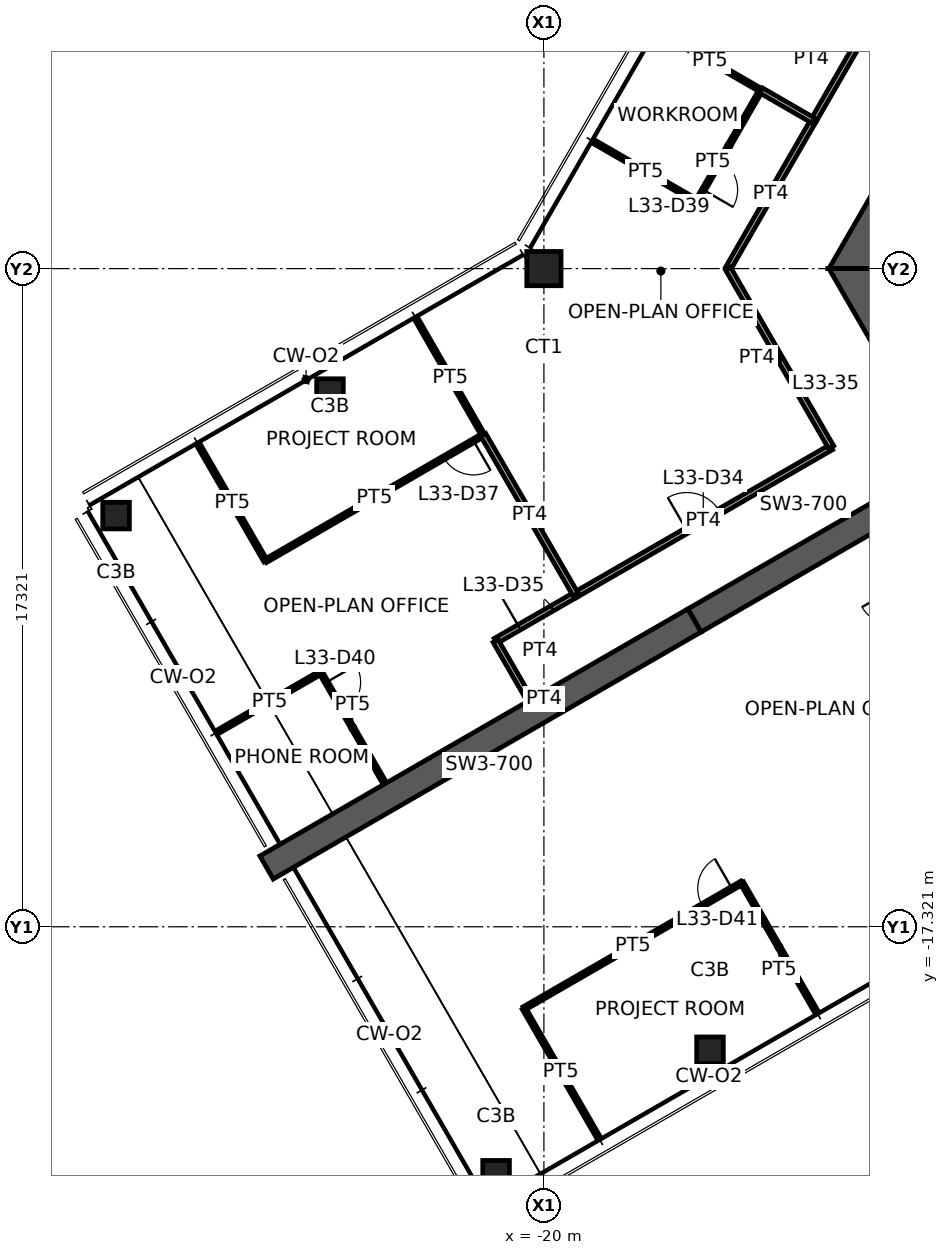
"""IFC4 building model, lengths in metres.
Left out: names, types, materials, properties, quantities, classifications, styles, units other than length and angle.
Written with IfcOpenShell. Run it as: python <this file> out.ifc"""

import sys

from ifc_helpers import new_model, si_unit, direction, frame, frame_2d, origin, origin_2d, place, context, subcontext, project, spatial, polyline, rectangle, hollow_rectangle, outline, extrude, element, fill, save


model = new_model("IFC4")
c1 = context("Model", 3, precision=1e-05, world=origin(), true_north=direction((0.0, 1.0)))
c2 = subcontext(c1, "Body", "Model", "MODEL_VIEW")
j1 = project(units=[si_unit("LENGTHUNIT", "METRE"), si_unit("PLANEANGLEUNIT", "RADIAN")], contexts=[c1])
p1 = place(None, origin())
s1 = spatial("IfcSite", under=j1, at=p1, CompositionType="ELEMENT")
p2 = place(p1, origin())
s2 = spatial("IfcBuilding", under=s1, at=p2, CompositionType="ELEMENT")
p3 = place(p2, frame((0.0, 0.0, 133.1)))
s3 = spatial("IfcBuildingStorey", under=s2, at=p3, CompositionType="ELEMENT", Elevation=133.1)
p4 = place(p3, frame((-20.0, 0.0, 0.0), z_axis=(0.0, 0.0, 1.0), x_axis=(1.0, 0.0, 0.0)))
e1 = element("IfcColumn", 1, at=p4, inside=s3, PredefinedType="COLUMN", context=c2, shape_type="SweptSolid", body=[
    extrude(hollow_rectangle(XDim=0.9, YDim=0.9, WallThickness=0.07, at=origin_2d()), origin(), (0.0, 0.0, 1.0), 3.9),
])
for number, where, z_axis, x_axis in (
    (2, (-25.629, -3.25, 0.0), (0.0, 0.0, 1.0), (1.0, 0.0, 0.0)),
    (3, (-31.258, -6.5, 0.0), (0.0, 0.0, 1.0), (1.0, 0.0, 0.0)),
    (4, (-15.629, -20.571, 0.0), (0.0, 0.0, 1.0), (1.0, 0.0, 0.0)),
    (5, (-21.258, -23.821, 0.0), (0.0, 0.0, 1.0), (1.0, 0.0, 0.0)),
):
    element("IfcColumn", number, at=place(p3, frame(where, z_axis=z_axis, x_axis=x_axis)), inside=s3, PredefinedType="COLUMN", context=c2, shape_type="SweptSolid", body=[
        extrude(hollow_rectangle(XDim=0.7, YDim=0.7, WallThickness=0.036, at=origin_2d()), origin(), (0.0, 0.0, 1.0), 3.9),
    ])
p5 = place(p3, frame((-5.961, 10.325, 0.0), z_axis=(0.0, 0.0, 1.0), x_axis=(-0.500004296715, -0.866022923061, 0.0)))
e6 = element("IfcWall", 6, at=p5, inside=s3, PredefinedType="SHEAR", context=c2, shape_type="SweptSolid", body=[
    extrude(outline(polyline([(-0.289, -0.5), (4.494, -0.5), (5.494, -0.5), (12.211, -0.5), (11.634, 0.5), (5.494, 0.5), (4.494, 0.5), (0.289, 0.5), (-0.289, -0.5)])), origin(), (0.0, 0.0, 1.0), 3.9),
])
p6 = place(p5, frame((4.494, 0.0, 0.0)))
e7 = element("IfcOpeningElement", 7, at=p6, cuts=e6, PredefinedType="OPENING", context=c2, shape_type="SweptSolid", body=[
    extrude(rectangle(XDim=1.0, YDim=2.1, at=frame_2d((0.5, 1.05))), frame((0.0, 0.51, 0.0), z_axis=(0.0, -1.0, 0.0), x_axis=(1.0, 0.0, 0.0)), (0.0, 0.0, 1.0), 1.02),
])
p7 = place(p3, frame((-11.922, 0.0, 0.0), z_axis=(0.0, 0.0, 1.0), x_axis=(0.500004296715, -0.866022923061, 0.0)))
e8 = element("IfcWall", 8, at=p7, inside=s3, PredefinedType="SHEAR", context=c2, shape_type="SweptSolid", body=[
    extrude(outline(polyline([(-0.289, -0.5), (6.331, -0.5), (7.131, -0.5), (12.211, -0.5), (11.634, 0.5), (7.131, 0.5), (6.331, 0.5), (0.289, 0.5), (-0.289, -0.5)])), origin(), (0.0, 0.0, 1.0), 3.9),
])
p8 = place(p7, frame((6.331, 0.0, 0.0)))
e9 = element("IfcOpeningElement", 9, at=p8, cuts=e8, PredefinedType="OPENING", context=c2, shape_type="SweptSolid", body=[
    extrude(rectangle(XDim=0.8, YDim=2.1, at=frame_2d((0.4, 1.05))), frame((0.0, 0.51, 0.0), z_axis=(0.0, -1.0, 0.0), x_axis=(1.0, 0.0, 0.0)), (0.0, 0.0, 1.0), 1.02),
])
p9 = place(p3, frame((-9.375, -5.413, 0.0), z_axis=(0.0, 0.0, 1.0), x_axis=(-0.866032377459, -0.499987921047, 0.0)))
e10 = element("IfcWall", 10, at=p9, inside=s3, PredefinedType="SHEAR", context=c2, shape_type="SweptSolid", body=[
    extrude(rectangle(XDim=7.696, YDim=0.7, at=frame_2d((3.848, 0.0))), origin(), (0.0, 0.0, 1.0), 3.9),
])
p10 = place(p9, frame((0.9, 0.0, 0.0)))
e11 = element("IfcOpeningElement", 11, at=p10, cuts=e10, PredefinedType="OPENING", context=c2, shape_type="SweptSolid", body=[
    extrude(rectangle(XDim=1.0, YDim=2.1, at=frame_2d((0.5, 1.05))), frame((0.0, 0.36, 0.0), z_axis=(0.0, -1.0, 0.0), x_axis=(1.0, 0.0, 0.0)), (0.0, 0.0, 1.0), 0.72),
])
p11 = place(p3, frame((-16.039, -9.26, 0.0), z_axis=(0.0, 0.0, 1.0), x_axis=(-0.866024837091, -0.50000098154, 0.0)))
e12 = element("IfcWall", 12, at=p11, inside=s3, PredefinedType="SHEAR", context=c2, shape_type="SweptSolid", body=[
    extrude(rectangle(XDim=13.0, YDim=0.7, at=frame_2d((6.5, 0.0))), origin(), (0.0, 0.0, 1.0), 3.9),
])
p12 = place(p3, frame((-19.171, -8.586, 0.0), z_axis=(0.0, 0.0, 1.0), x_axis=(0.866007176269, 0.500031569654, 0.0)))
e13 = element("IfcWall", 13, at=p12, inside=s3, PredefinedType="PARTITIONING", context=c2, shape_type="SweptSolid", body=[
    extrude(rectangle(XDim=7.771, YDim=0.15, at=frame_2d((3.885, 0.0))), origin(), (0.0, 0.0, 1.0), 2.95),
])
p13 = place(p12, frame((3.385, 0.0, 0.0)))
e14 = element("IfcOpeningElement", 14, at=p13, cuts=e13, PredefinedType="OPENING", context=c2, shape_type="SweptSolid", body=[
    extrude(rectangle(XDim=1.0, YDim=2.1, at=frame_2d((0.5, 1.05))), frame((0.0, 0.085, 0.0), z_axis=(0.0, -1.0, 0.0), x_axis=(1.0, 0.0, 0.0)), (0.0, 0.0, 1.0), 0.17),
])
p14 = place(p3, frame((-15.156, 0.0, 0.0), z_axis=(0.0, 0.0, 1.0), x_axis=(0.500014848696, 0.866016830716, 0.0)))
e15 = element("IfcWall", 15, at=p14, inside=s3, PredefinedType="PARTITIONING", context=c2, shape_type="SweptSolid", body=[
    extrude(rectangle(XDim=4.505, YDim=0.15, at=frame_2d((2.252, 0.0))), origin(), (0.0, 0.0, 1.0), 2.95),
])
p15 = place(p3, frame((-12.442, -4.7, 0.0), z_axis=(0.0, 0.0, 1.0), x_axis=(-0.500009286329, 0.866020042254, 0.0)))
e16 = element("IfcWall", 16, at=p15, inside=s3, PredefinedType="PARTITIONING", context=c2, shape_type="SweptSolid", body=[
    extrude(rectangle(XDim=5.428, YDim=0.15, at=frame_2d((2.714, 0.0))), origin(), (0.0, 0.0, 1.0), 2.95),
])
p16 = place(p3, frame((-21.271, -9.798, 0.0), z_axis=(0.0, 0.0, 1.0), x_axis=(0.866025270247, 0.500000231294, 0.0)))
e17 = element("IfcWall", 17, at=p16, inside=s3, PredefinedType="PARTITIONING", context=c2, shape_type="SweptSolid", body=[
    extrude(rectangle(XDim=2.435, YDim=0.15, at=frame_2d((1.217, 0.0))), origin(), (0.0, 0.0, 1.0), 2.95),
])
p17 = place(p16, frame((0.717, 0.0, 0.0)))
e18 = element("IfcOpeningElement", 18, at=p17, cuts=e17, PredefinedType="OPENING", context=c2, shape_type="SweptSolid", body=[
    extrude(rectangle(XDim=1.0, YDim=2.1, at=frame_2d((0.5, 1.05))), frame((0.0, 0.085, 0.0), z_axis=(0.0, -1.0, 0.0), x_axis=(1.0, 0.0, 0.0)), (0.0, 0.0, 1.0), 0.17),
])
p18 = place(p3, frame((-20.381, -11.34, 0.0), z_axis=(0.0, 0.0, 1.0), x_axis=(-0.500062787734, 0.865989150234, 0.0)))
e19 = element("IfcWall", 19, at=p18, inside=s3, PredefinedType="PARTITIONING", context=c2, shape_type="SweptSolid", body=[
    extrude(rectangle(XDim=1.78, YDim=0.15, at=frame_2d((0.89, 0.0))), origin(), (0.0, 0.0, 1.0), 2.95),
])
p19 = place(p3, frame((-12.908, 3.893, 0.0), z_axis=(0.0, 0.0, 1.0), x_axis=(0.500006411147, 0.866021702275, 0.0)))
e20 = element("IfcWall", 20, at=p19, inside=s3, PredefinedType="PARTITIONING", context=c2, shape_type="SweptSolid", body=[
    extrude(rectangle(XDim=7.095, YDim=0.15, at=frame_2d((3.548, 0.0))), origin(), (0.0, 0.0, 1.0), 2.95),
])
p20 = place(p19, frame((3.047, 0.0, 0.0)))
e21 = element("IfcOpeningElement", 21, at=p20, cuts=e20, PredefinedType="OPENING", context=c2, shape_type="SweptSolid", body=[
    extrude(rectangle(XDim=1.0, YDim=2.1, at=frame_2d((0.5, 1.05))), frame((0.0, 0.085, 0.0), z_axis=(0.0, -1.0, 0.0), x_axis=(1.0, 0.0, 0.0)), (0.0, 0.0, 1.0), 0.17),
])
p21 = place(p3, frame((-23.332, -1.37, 0.0), z_axis=(0.0, 0.0, 1.0), x_axis=(0.498863855434, -0.86668036423, 0.0)))
e22 = element("IfcWall", 22, at=p21, inside=s3, PredefinedType="PARTITIONING", context=c2, shape_type="SweptSolid", body=[
    extrude(rectangle(XDim=3.48, YDim=0.1, at=frame_2d((1.74, 0.0))), origin(), (0.0, 0.0, 1.0), 2.95),
])
p22 = place(p3, frame((-27.325, -7.693, 0.0), z_axis=(0.0, 0.0, 1.0), x_axis=(-0.499989765943, 0.866031312339, 0.0)))
e23 = element("IfcWall", 23, at=p22, inside=s3, PredefinedType="PARTITIONING", context=c2, shape_type="SweptSolid", body=[
    extrude(rectangle(XDim=3.505, YDim=0.1, at=frame_2d((1.752, 0.0))), origin(), (0.0, 0.0, 1.0), 2.95),
])
p23 = place(p3, frame((-21.594, -4.379, 0.0), z_axis=(0.0, 0.0, 1.0), x_axis=(-0.865682888643, -0.500592784916, 0.0)))
e24 = element("IfcWall", 24, at=p23, inside=s3, PredefinedType="PARTITIONING", context=c2, shape_type="SweptSolid", body=[
    extrude(rectangle(XDim=6.62, YDim=0.1, at=frame_2d((3.31, 0.0))), origin(), (0.0, 0.0, 1.0), 2.95),
])
p24 = place(p23, frame((0.3, 0.0, 0.0)))
e25 = element("IfcOpeningElement", 25, at=p24, cuts=e24, PredefinedType="OPENING", context=c2, shape_type="SweptSolid", body=[
    extrude(rectangle(XDim=0.9, YDim=2.1, at=frame_2d((0.45, 1.05))), frame((0.0, 0.06, 0.0), z_axis=(0.0, -1.0, 0.0), x_axis=(1.0, 0.0, 0.0)), (0.0, 0.0, 1.0), 0.12),
])
p25 = place(p3, frame((-15.974, 1.773, 0.0), z_axis=(0.0, 0.0, 1.0), x_axis=(-0.866032025414, 0.499988530825, 0.0)))
e26 = element("IfcWall", 26, at=p25, inside=s3, PredefinedType="PARTITIONING", context=c2, shape_type="SweptSolid", body=[
    extrude(rectangle(XDim=3.124, YDim=0.1, at=frame_2d((1.562, 0.0))), origin(), (0.0, 0.0, 1.0), 2.95),
])
p26 = place(p3, frame((-14.291, 4.698, 0.0), z_axis=(0.0, 0.0, 1.0), x_axis=(-0.498809626432, -0.86671157635, 0.0)))
e27 = element("IfcWall", 27, at=p26, inside=s3, PredefinedType="PARTITIONING", context=c2, shape_type="SweptSolid", body=[
    extrude(rectangle(XDim=3.374, YDim=0.1, at=frame_2d((1.687, 0.0))), origin(), (0.0, 0.0, 1.0), 2.95),
])
p27 = place(p26, frame((2.131, 0.0, 0.0)))
e28 = element("IfcOpeningElement", 28, at=p27, cuts=e27, PredefinedType="OPENING", context=c2, shape_type="SweptSolid", body=[
    extrude(rectangle(XDim=0.9, YDim=2.1, at=frame_2d((0.45, 1.05))), frame((0.0, 0.06, 0.0), z_axis=(0.0, -1.0, 0.0), x_axis=(1.0, 0.0, 0.0)), (0.0, 0.0, 1.0), 0.12),
])
for number, where, z_axis, x_axis in (
    (29, (-16.976, 6.248, 0.0), (0.0, 0.0, 1.0), (0.865, -0.501, 0.0)),
    (30, (-28.562, -12.18, 0.0), (0.0, 0.0, 1.0), (0.866, 0.5, 0.0)),
):
    element("IfcWall", number, at=place(p3, frame(where, z_axis=z_axis, x_axis=x_axis)), inside=s3, PredefinedType="PARTITIONING", context=c2, shape_type="SweptSolid", body=[
        extrude(rectangle(XDim=3.105, YDim=0.1, at=frame_2d((1.553, 0.0))), origin(), (0.0, 0.0, 1.0), 2.95),
    ])
p28 = place(p3, frame((-25.873, -10.627, 0.0), z_axis=(0.0, 0.0, 1.0), x_axis=(0.5000115033, -0.866018762249, 0.0)))
e31 = element("IfcWall", 31, at=p28, inside=s3, PredefinedType="PARTITIONING", context=c2, shape_type="SweptSolid", body=[
    extrude(rectangle(XDim=3.363, YDim=0.1, at=frame_2d((1.682, 0.0))), origin(), (0.0, 0.0, 1.0), 2.95),
])
p29 = place(p28, frame((0.3, 0.0, 0.0)))
e32 = element("IfcOpeningElement", 32, at=p29, cuts=e31, PredefinedType="OPENING", context=c2, shape_type="SweptSolid", body=[
    extrude(rectangle(XDim=0.9, YDim=2.1, at=frame_2d((0.45, 1.05))), frame((0.0, 0.06, 0.0), z_axis=(0.0, -1.0, 0.0), x_axis=(1.0, 0.0, 0.0)), (0.0, 0.0, 1.0), 0.12),
])
p30 = place(p3, frame((-19.163, -8.581, 0.0), z_axis=(0.0, 0.0, 1.0), x_axis=(-0.500843945189, 0.865537603209, 0.0)))
e33 = element("IfcWall", 33, at=p30, inside=s3, PredefinedType="PARTITIONING", context=c2, shape_type="SweptSolid", body=[
    extrude(rectangle(XDim=4.854, YDim=0.15, at=frame_2d((2.427, 0.0))), origin(), (0.0, 0.0, 1.0), 2.95),
])
p31 = place(p3, frame((-14.289, 4.691, 0.0), z_axis=(0.0, 0.0, 1.0), x_axis=(0.865925490132, -0.500173015605, 0.0)))
e34 = element("IfcWall", 34, at=p31, inside=s3, PredefinedType="PARTITIONING", context=c2, shape_type="SweptSolid", body=[
    extrude(rectangle(XDim=1.595, YDim=0.15, at=frame_2d((0.797, 0.0))), origin(), (0.0, 0.0, 1.0), 2.95),
])
p32 = place(p3, frame((-20.525, -19.471, 0.0), z_axis=(0.0, 0.0, 1.0), x_axis=(0.866021597574, 0.500006592492, 0.0)))
e35 = element("IfcWall", 35, at=p32, inside=s3, PredefinedType="PARTITIONING", context=c2, shape_type="SweptSolid", body=[
    extrude(rectangle(XDim=6.62, YDim=0.1, at=frame_2d((3.31, 0.0))), origin(), (0.0, 0.0, 1.0), 2.95),
])
p33 = place(p32, frame((5.42, 0.0, 0.0)))
e36 = element("IfcOpeningElement", 36, at=p33, cuts=e35, PredefinedType="OPENING", context=c2, shape_type="SweptSolid", body=[
    extrude(rectangle(XDim=0.9, YDim=2.1, at=frame_2d((0.45, 1.05))), frame((0.0, 0.06, 0.0), z_axis=(0.0, -1.0, 0.0), x_axis=(1.0, 0.0, 0.0)), (0.0, 0.0, 1.0), 0.12),
])
p34 = place(p3, frame((-18.585, -22.831, 0.0), z_axis=(0.0, 0.0, 1.0), x_axis=(-0.499996613652, 0.866027358884, 0.0)))
e37 = element("IfcWall", 37, at=p34, inside=s3, PredefinedType="PARTITIONING", context=c2, shape_type="SweptSolid", body=[
    extrude(rectangle(XDim=3.88, YDim=0.1, at=frame_2d((1.94, 0.0))), origin(), (0.0, 0.0, 1.0), 2.95),
])
p35 = place(p3, frame((-14.792, -16.161, 0.0), z_axis=(0.0, 0.0, 1.0), x_axis=(0.500025510799, -0.866010674617, 0.0)))
e38 = element("IfcWall", 38, at=p35, inside=s3, PredefinedType="PARTITIONING", context=c2, shape_type="SweptSolid", body=[
    extrude(rectangle(XDim=3.905, YDim=0.1, at=frame_2d((1.953, 0.0))), origin(), (0.0, 0.0, 1.0), 2.95),
])
p36 = place(p13, origin())
e39 = element("IfcDoor", 39, at=p36, inside=s3, OperationType="SINGLE_SWING_LEFT", PredefinedType="DOOR", context=c2, shape_type="SweptSolid", body=[
    extrude(rectangle(XDim=1.0, YDim=2.1, at=frame_2d((0.5, 1.05))), frame((0.0, 0.025, 0.0), z_axis=(0.0, -1.0, 0.0), x_axis=(1.0, 0.0, 0.0)), (0.0, 0.0, 1.0), 0.05),
])
fill(e14, e39)
p37 = place(p17, origin())
e40 = element("IfcDoor", 40, at=p37, inside=s3, OperationType="SINGLE_SWING_LEFT", PredefinedType="DOOR", context=c2, shape_type="SweptSolid", body=[
    extrude(rectangle(XDim=1.0, YDim=2.1, at=frame_2d((0.5, 1.05))), frame((0.0, 0.025, 0.0), z_axis=(0.0, -1.0, 0.0), x_axis=(1.0, 0.0, 0.0)), (0.0, 0.0, 1.0), 0.05),
])
fill(e18, e40)
p38 = place(p24, origin())
e41 = element("IfcDoor", 41, at=p38, inside=s3, OperationType="SINGLE_SWING_LEFT", PredefinedType="DOOR", context=c2, shape_type="SweptSolid", body=[
    extrude(rectangle(XDim=0.9, YDim=2.1, at=frame_2d((0.45, 1.05))), frame((0.0, 0.025, 0.0), z_axis=(0.0, -1.0, 0.0), x_axis=(1.0, 0.0, 0.0)), (0.0, 0.0, 1.0), 0.05),
])
fill(e25, e41)
p39 = place(p27, origin())
e42 = element("IfcDoor", 42, at=p39, inside=s3, OperationType="SINGLE_SWING_RIGHT", PredefinedType="DOOR", context=c2, shape_type="SweptSolid", body=[
    extrude(rectangle(XDim=0.9, YDim=2.1, at=frame_2d((0.45, 1.05))), frame((0.0, 0.025, 0.0), z_axis=(0.0, -1.0, 0.0), x_axis=(1.0, 0.0, 0.0)), (0.0, 0.0, 1.0), 0.05),
])
fill(e28, e42)
p40 = place(p29, origin())
e43 = element("IfcDoor", 43, at=p40, inside=s3, OperationType="SINGLE_SWING_LEFT", PredefinedType="DOOR", context=c2, shape_type="SweptSolid", body=[
    extrude(rectangle(XDim=0.9, YDim=2.1, at=frame_2d((0.45, 1.05))), frame((0.0, 0.025, 0.0), z_axis=(0.0, -1.0, 0.0), x_axis=(1.0, 0.0, 0.0)), (0.0, 0.0, 1.0), 0.05),
])
fill(e32, e43)
p41 = place(p33, origin())
e44 = element("IfcDoor", 44, at=p41, inside=s3, OperationType="SINGLE_SWING_RIGHT", PredefinedType="DOOR", context=c2, shape_type="SweptSolid", body=[
    extrude(rectangle(XDim=0.9, YDim=2.1, at=frame_2d((0.45, 1.05))), frame((0.0, 0.025, 0.0), z_axis=(0.0, -1.0, 0.0), x_axis=(1.0, 0.0, 0.0)), (0.0, 0.0, 1.0), 0.05),
])
fill(e36, e44)
save(model, sys.argv[1])
